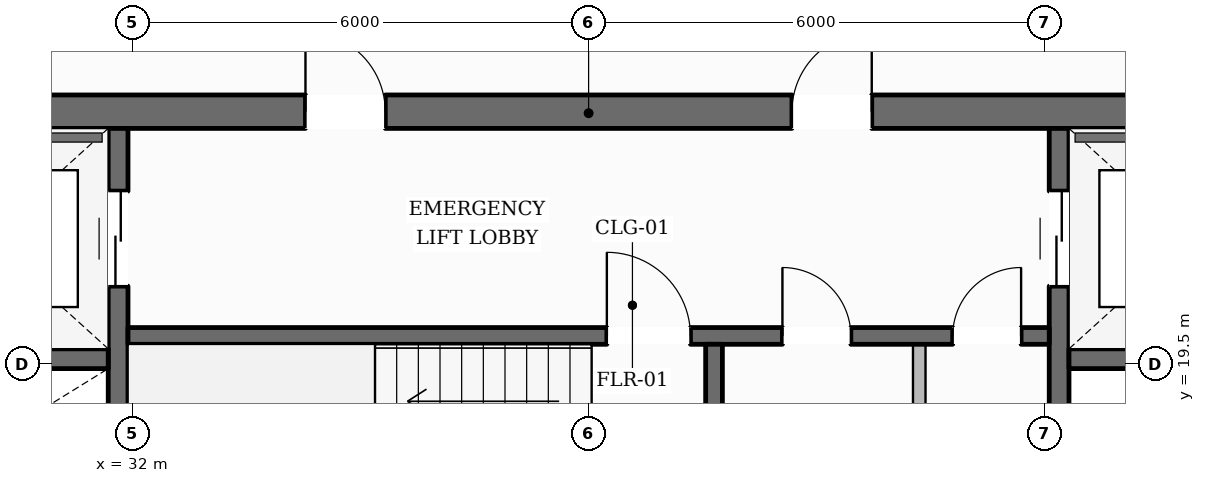
"""IFC4 building model, lengths in metres.
Left out: names, types, materials, properties, quantities, classifications, styles, units other than length and angle.
Written with IfcOpenShell. Run it as: python <this file> out.ifc"""

import sys

from ifc_helpers import new_model, si_unit, direction, frame, frame_2d, origin, place, context, subcontext, project, spatial, rectangle, extrude, element, fill, save


model = new_model("IFC4")
c1 = context("Model", 3, precision=1e-05, world=origin(), true_north=direction((0.0, 1.0)))
c2 = subcontext(c1, "Body", "Model", "MODEL_VIEW")
j1 = project(units=[si_unit("LENGTHUNIT", "METRE"), si_unit("PLANEANGLEUNIT", "RADIAN")], contexts=[c1])
p1 = place(None, origin())
s1 = spatial("IfcSite", under=j1, at=p1, CompositionType="ELEMENT")
p2 = place(p1, origin())
s2 = spatial("IfcBuilding", under=s1, at=p2, CompositionType="ELEMENT")
p3 = place(p2, frame((0.0, 0.0, 188.1)))
s3 = spatial("IfcBuildingStorey", under=s2, at=p3, CompositionType="ELEMENT", Elevation=188.1)
p4 = place(p3, frame((28.04, 22.82, 0.0), z_axis=(0.0, 0.0, 1.0), x_axis=(1.0, 0.0, 0.0)))
e1 = element("IfcWall", 1, at=p4, inside=s3, PredefinedType="SOLIDWALL", context=c2, shape_type="SweptSolid", body=[
    extrude(rectangle(XDim=19.92, YDim=0.44, at=frame_2d((9.96, 0.0))), origin(), (0.0, 0.0, 1.0), 3.6),
])
p5 = place(p4, frame((6.235, 0.0, 0.0)))
e2 = element("IfcOpeningElement", 2, at=p5, cuts=e1, PredefinedType="OPENING", context=c2, shape_type="SweptSolid", body=[
    extrude(rectangle(XDim=1.05, YDim=2.15, at=frame_2d((0.525, 1.075))), frame((0.0, 0.23, 0.0), z_axis=(0.0, -1.0, 0.0), x_axis=(1.0, 0.0, 0.0)), (0.0, 0.0, 1.0), 0.46),
])
p6 = place(p4, frame((12.635, 0.0, 0.0)))
e3 = element("IfcOpeningElement", 3, at=p6, cuts=e1, PredefinedType="OPENING", context=c2, shape_type="SweptSolid", body=[
    extrude(rectangle(XDim=1.05, YDim=2.15, at=frame_2d((0.525, 1.075))), frame((0.0, 0.23, 0.0), z_axis=(0.0, -1.0, 0.0), x_axis=(1.0, 0.0, 0.0)), (0.0, 0.0, 1.0), 0.46),
])
p7 = place(p3, frame((31.81, 9.6, 0.0), z_axis=(0.0, 0.0, 1.0), x_axis=(0.0, 1.0, 0.0)))
e4 = element("IfcWall", 4, at=p7, inside=s3, PredefinedType="SHEAR", context=c2, shape_type="SweptSolid", body=[
    extrude(rectangle(XDim=13.0, YDim=0.26, at=frame_2d((6.5, 0.0))), origin(), (0.0, 0.0, 1.0), 3.6),
])
p8 = place(p7, frame((10.925, 0.0, 0.0)))
e5 = element("IfcOpeningElement", 5, at=p8, cuts=e4, PredefinedType="OPENING", context=c2, shape_type="SweptSolid", body=[
    extrude(rectangle(XDim=1.25, YDim=2.25, at=frame_2d((0.625, 1.125))), frame((0.0, 0.14, 0.0), z_axis=(0.0, -1.0, 0.0), x_axis=(1.0, 0.0, 0.0)), (0.0, 0.0, 1.0), 0.28),
])
p9 = place(p3, frame((44.19, 9.6, 0.0), z_axis=(0.0, 0.0, 1.0), x_axis=(0.0, 1.0, 0.0)))
e6 = element("IfcWall", 6, at=p9, inside=s3, PredefinedType="SHEAR", context=c2, shape_type="SweptSolid", body=[
    extrude(rectangle(XDim=13.0, YDim=0.26, at=frame_2d((6.5, 0.0))), origin(), (0.0, 0.0, 1.0), 3.6),
])
p10 = place(p9, frame((10.925, 0.0, 0.0)))
e7 = element("IfcOpeningElement", 7, at=p10, cuts=e6, PredefinedType="OPENING", context=c2, shape_type="SweptSolid", body=[
    extrude(rectangle(XDim=1.25, YDim=2.25, at=frame_2d((0.625, 1.125))), frame((0.0, 0.14, 0.0), z_axis=(0.0, -1.0, 0.0), x_axis=(1.0, 0.0, 0.0)), (0.0, 0.0, 1.0), 0.28),
])
for number, where, z_axis, x_axis in (
    (8, (28.48, 19.57, 0.0), (0.0, 0.0, 1.0), (1.0, 0.0, 0.0)),
    (9, (44.32, 19.57, 0.0), (0.0, 0.0, 1.0), (1.0, 0.0, 0.0)),
):
    element("IfcWall", number, at=place(p3, frame(where, z_axis=z_axis, x_axis=x_axis)), inside=s3, PredefinedType="SHEAR", context=c2, shape_type="SweptSolid", body=[
        extrude(rectangle(XDim=3.2, YDim=0.26, at=frame_2d((1.6, 0.0))), origin(), (0.0, 0.0, 1.0), 3.6),
    ])
p11 = place(p3, frame((31.94, 19.87, 0.0), z_axis=(0.0, 0.0, 1.0), x_axis=(1.0, 0.0, 0.0)))
e10 = element("IfcWall", 10, at=p11, inside=s3, PredefinedType="SOLIDWALL", context=c2, shape_type="SweptSolid", body=[
    extrude(rectangle(XDim=12.12, YDim=0.22, at=frame_2d((6.06, 0.0))), origin(), (0.0, 0.0, 1.0), 3.6),
])
p12 = place(p11, frame((6.3, 0.0, 0.0)))
e11 = element("IfcOpeningElement", 11, at=p12, cuts=e10, PredefinedType="OPENING", context=c2, shape_type="SweptSolid", body=[
    extrude(rectangle(XDim=1.1, YDim=2.15, at=frame_2d((0.55, 1.075))), frame((0.0, 0.12, 0.0), z_axis=(0.0, -1.0, 0.0), x_axis=(1.0, 0.0, 0.0)), (0.0, 0.0, 1.0), 0.24),
])
p13 = place(p11, frame((8.61, 0.0, 0.0)))
e12 = element("IfcOpeningElement", 12, at=p13, cuts=e10, PredefinedType="OPENING", context=c2, shape_type="SweptSolid", body=[
    extrude(rectangle(XDim=0.9, YDim=2.1, at=frame_2d((0.45, 1.05))), frame((0.0, 0.12, 0.0), z_axis=(0.0, -1.0, 0.0), x_axis=(1.0, 0.0, 0.0)), (0.0, 0.0, 1.0), 0.24),
])
p14 = place(p11, frame((10.85, 0.0, 0.0)))
e13 = element("IfcOpeningElement", 13, at=p14, cuts=e10, PredefinedType="OPENING", context=c2, shape_type="SweptSolid", body=[
    extrude(rectangle(XDim=0.9, YDim=2.1, at=frame_2d((0.45, 1.05))), frame((0.0, 0.12, 0.0), z_axis=(0.0, -1.0, 0.0), x_axis=(1.0, 0.0, 0.0)), (0.0, 0.0, 1.0), 0.24),
])
p15 = place(p3, frame((39.65, 16.56, 0.0), z_axis=(0.0, 0.0, 1.0), x_axis=(0.0, 1.0, 0.0)))
e14 = element("IfcWall", 14, at=p15, inside=s3, PredefinedType="SOLIDWALL", context=c2, shape_type="SweptSolid", body=[
    extrude(rectangle(XDim=3.2, YDim=0.22, at=frame_2d((1.6, 0.0))), origin(), (0.0, 0.0, 1.0), 3.6),
])
p16 = place(p3, frame((15.064, 11.953, 0.0), z_axis=(0.0, 0.0, 1.0), x_axis=(0.495993114815, 0.86832645362, 0.0)))
e15 = element("IfcWall", 15, at=p16, inside=s3, PredefinedType="STANDARD", context=c2, shape_type="SweptSolid", body=[
    extrude(rectangle(XDim=37.324, YDim=0.35, at=frame_2d((18.662, 0.0))), origin(), (0.0, 0.0, 1.0), 3.132),
])
p17 = place(p16, frame((33.087, 0.0, 0.65)))
e16 = element("IfcOpeningElement", 16, at=p17, cuts=e15, PredefinedType="OPENING", context=c2, shape_type="SweptSolid", body=[
    extrude(rectangle(XDim=1.45, YDim=1.75, at=frame_2d((0.725, 0.875))), frame((0.0, 0.185, 0.0), z_axis=(0.0, -1.0, 0.0), x_axis=(1.0, 0.0, 0.0)), (0.0, 0.0, 1.0), 0.37),
])
p18 = place(p16, frame((27.026, 0.0, 0.65)))
e17 = element("IfcOpeningElement", 17, at=p18, cuts=e15, PredefinedType="OPENING", context=c2, shape_type="SweptSolid", body=[
    extrude(rectangle(XDim=1.45, YDim=1.75, at=frame_2d((0.725, 0.875))), frame((0.0, 0.185, 0.0), z_axis=(0.0, -1.0, 0.0), x_axis=(1.0, 0.0, 0.0)), (0.0, 0.0, 1.0), 0.37),
])
p19 = place(p16, frame((14.904, 0.0, 0.65)))
e18 = element("IfcOpeningElement", 18, at=p19, cuts=e15, PredefinedType="OPENING", context=c2, shape_type="SweptSolid", body=[
    extrude(rectangle(XDim=1.45, YDim=1.75, at=frame_2d((0.725, 0.875))), frame((0.0, 0.185, 0.0), z_axis=(0.0, -1.0, 0.0), x_axis=(1.0, 0.0, 0.0)), (0.0, 0.0, 1.0), 0.37),
])
p20 = place(p16, frame((8.844, 0.0, 0.65)))
e19 = element("IfcOpeningElement", 19, at=p20, cuts=e15, PredefinedType="OPENING", context=c2, shape_type="SweptSolid", body=[
    extrude(rectangle(XDim=1.45, YDim=1.75, at=frame_2d((0.725, 0.875))), frame((0.0, 0.185, 0.0), z_axis=(0.0, -1.0, 0.0), x_axis=(1.0, 0.0, 0.0)), (0.0, 0.0, 1.0), 0.37),
])
p21 = place(p16, frame((2.782, 0.0, 0.65)))
e20 = element("IfcOpeningElement", 20, at=p21, cuts=e15, PredefinedType="OPENING", context=c2, shape_type="SweptSolid", body=[
    extrude(rectangle(XDim=1.45, YDim=1.75, at=frame_2d((0.725, 0.875))), frame((0.0, 0.185, 0.0), z_axis=(0.0, -1.0, 0.0), x_axis=(1.0, 0.0, 0.0)), (0.0, 0.0, 1.0), 0.37),
])
p22 = place(p3, frame((42.575, 44.272, 0.0), z_axis=(0.0, 0.0, 1.0), x_axis=(0.503934681705, -0.863741764982, 0.0)))
e21 = element("IfcWall", 21, at=p22, inside=s3, PredefinedType="STANDARD", context=c2, shape_type="SweptSolid", body=[
    extrude(rectangle(XDim=37.915, YDim=0.35, at=frame_2d((18.958, 0.0))), origin(), (0.0, 0.0, 1.0), 3.132),
])
p23 = place(p22, frame((33.633, 0.0, 0.65)))
e22 = element("IfcOpeningElement", 22, at=p23, cuts=e21, PredefinedType="OPENING", context=c2, shape_type="SweptSolid", body=[
    extrude(rectangle(XDim=1.45, YDim=1.75, at=frame_2d((0.725, 0.875))), frame((0.0, 0.185, 0.0), z_axis=(0.0, -1.0, 0.0), x_axis=(1.0, 0.0, 0.0)), (0.0, 0.0, 1.0), 0.37),
])
p24 = place(p22, frame((27.472, 0.0, 0.65)))
e23 = element("IfcOpeningElement", 23, at=p24, cuts=e21, PredefinedType="OPENING", context=c2, shape_type="SweptSolid", body=[
    extrude(rectangle(XDim=1.45, YDim=1.75, at=frame_2d((0.725, 0.875))), frame((0.0, 0.185, 0.0), z_axis=(0.0, -1.0, 0.0), x_axis=(1.0, 0.0, 0.0)), (0.0, 0.0, 1.0), 0.37),
])
p25 = place(p22, frame((15.15, 0.0, 0.65)))
e24 = element("IfcOpeningElement", 24, at=p25, cuts=e21, PredefinedType="OPENING", context=c2, shape_type="SweptSolid", body=[
    extrude(rectangle(XDim=1.45, YDim=1.75, at=frame_2d((0.725, 0.875))), frame((0.0, 0.185, 0.0), z_axis=(0.0, -1.0, 0.0), x_axis=(1.0, 0.0, 0.0)), (0.0, 0.0, 1.0), 0.37),
])
p26 = place(p22, frame((8.989, 0.0, 0.65)))
e25 = element("IfcOpeningElement", 25, at=p26, cuts=e21, PredefinedType="OPENING", context=c2, shape_type="SweptSolid", body=[
    extrude(rectangle(XDim=1.45, YDim=1.75, at=frame_2d((0.725, 0.875))), frame((0.0, 0.185, 0.0), z_axis=(0.0, -1.0, 0.0), x_axis=(1.0, 0.0, 0.0)), (0.0, 0.0, 1.0), 0.37),
])
p27 = place(p22, frame((2.828, 0.0, 0.65)))
e26 = element("IfcOpeningElement", 26, at=p27, cuts=e21, PredefinedType="OPENING", context=c2, shape_type="SweptSolid", body=[
    extrude(rectangle(XDim=1.45, YDim=1.75, at=frame_2d((0.725, 0.875))), frame((0.0, 0.185, 0.0), z_axis=(0.0, -1.0, 0.0), x_axis=(1.0, 0.0, 0.0)), (0.0, 0.0, 1.0), 0.37),
])
p28 = place(p3, frame((42.35, 16.56, 0.0), z_axis=(0.0, 0.0, 1.0), x_axis=(0.0, 1.0, 0.0)))
e27 = element("IfcWall", 27, at=p28, inside=s3, PredefinedType="PARTITIONING", context=c2, shape_type="SweptSolid", body=[
    extrude(rectangle(XDim=3.2, YDim=0.165, at=frame_2d((1.6, 0.0))), origin(), (0.0, 0.0, 1.0), 3.6),
])
p29 = place(p12, origin())
e28 = element("IfcDoor", 28, at=p29, inside=s3, OperationType="SINGLE_SWING_LEFT", PredefinedType="DOOR", context=c2, shape_type="SweptSolid", body=[
    extrude(rectangle(XDim=1.1, YDim=2.15, at=frame_2d((0.55, 1.075))), frame((0.0, 0.025, 0.0), z_axis=(0.0, -1.0, 0.0), x_axis=(1.0, 0.0, 0.0)), (0.0, 0.0, 1.0), 0.05),
])
fill(e11, e28)
p30 = place(p5, origin())
e29 = element("IfcDoor", 29, at=p30, inside=s3, OperationType="SINGLE_SWING_LEFT", PredefinedType="DOOR", context=c2, shape_type="SweptSolid", body=[
    extrude(rectangle(XDim=1.05, YDim=2.15, at=frame_2d((0.525, 1.075))), frame((0.0, 0.025, 0.0), z_axis=(0.0, -1.0, 0.0), x_axis=(1.0, 0.0, 0.0)), (0.0, 0.0, 1.0), 0.05),
])
fill(e2, e29)
p31 = place(p6, origin())
e30 = element("IfcDoor", 30, at=p31, inside=s3, OperationType="SINGLE_SWING_RIGHT", PredefinedType="DOOR", context=c2, shape_type="SweptSolid", body=[
    extrude(rectangle(XDim=1.05, YDim=2.15, at=frame_2d((0.525, 1.075))), frame((0.0, 0.025, 0.0), z_axis=(0.0, -1.0, 0.0), x_axis=(1.0, 0.0, 0.0)), (0.0, 0.0, 1.0), 0.05),
])
fill(e3, e30)
p32 = place(p8, origin())
e31 = element("IfcDoor", 31, at=p32, inside=s3, OperationType="DOUBLE_DOOR_SLIDING", PredefinedType="DOOR", context=c2, shape_type="SweptSolid", body=[
    extrude(rectangle(XDim=1.25, YDim=2.25, at=frame_2d((0.625, 1.125))), frame((0.0, 0.025, 0.0), z_axis=(0.0, -1.0, 0.0), x_axis=(1.0, 0.0, 0.0)), (0.0, 0.0, 1.0), 0.05),
])
fill(e5, e31)
p33 = place(p10, origin())
e32 = element("IfcDoor", 32, at=p33, inside=s3, OperationType="DOUBLE_DOOR_SLIDING", PredefinedType="DOOR", context=c2, shape_type="SweptSolid", body=[
    extrude(rectangle(XDim=1.25, YDim=2.25, at=frame_2d((0.625, 1.125))), frame((0.0, 0.025, 0.0), z_axis=(0.0, -1.0, 0.0), x_axis=(1.0, 0.0, 0.0)), (0.0, 0.0, 1.0), 0.05),
])
fill(e7, e32)
p34 = place(p13, origin())
e33 = element("IfcDoor", 33, at=p34, inside=s3, OperationType="SINGLE_SWING_LEFT", PredefinedType="DOOR", context=c2, shape_type="SweptSolid", body=[
    extrude(rectangle(XDim=0.9, YDim=2.1, at=frame_2d((0.45, 1.05))), frame((0.0, 0.025, 0.0), z_axis=(0.0, -1.0, 0.0), x_axis=(1.0, 0.0, 0.0)), (0.0, 0.0, 1.0), 0.05),
])
fill(e12, e33)
p35 = place(p14, origin())
e34 = element("IfcDoor", 34, at=p35, inside=s3, OperationType="SINGLE_SWING_RIGHT", PredefinedType="DOOR", context=c2, shape_type="SweptSolid", body=[
    extrude(rectangle(XDim=0.9, YDim=2.1, at=frame_2d((0.45, 1.05))), frame((0.0, 0.025, 0.0), z_axis=(0.0, -1.0, 0.0), x_axis=(1.0, 0.0, 0.0)), (0.0, 0.0, 1.0), 0.05),
])
fill(e13, e34)
save(model, sys.argv[1])
